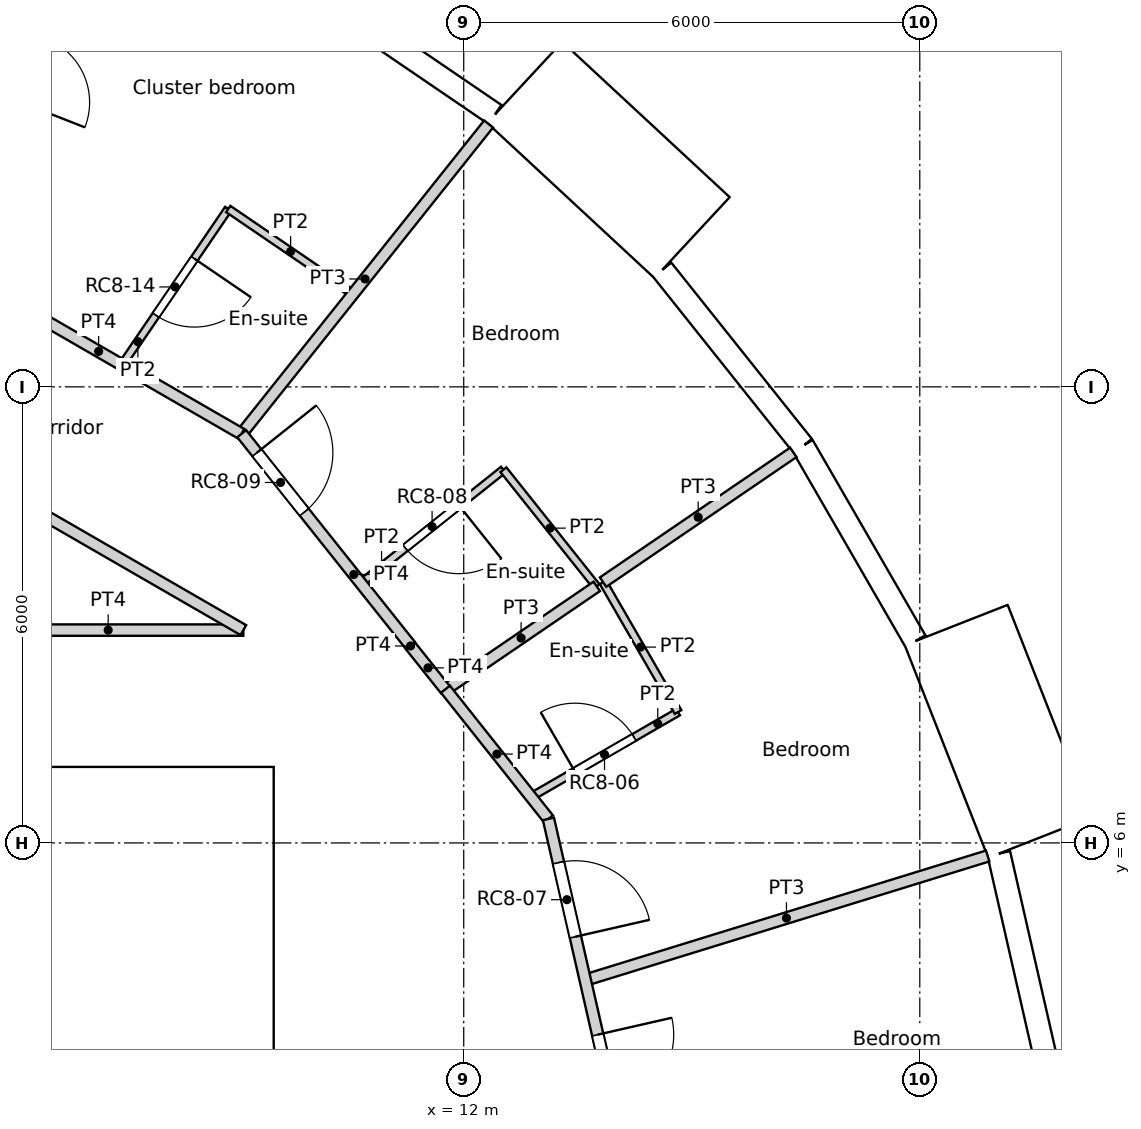
"""IFC4 building model, lengths in metres.
Left out: names, types, materials, properties, quantities, classifications, styles, units other than length and angle.
Written with IfcOpenShell. Run it as: python <this file> out.ifc"""

import sys

from ifc_helpers import new_model, si_unit, direction, frame, frame_2d, origin, origin_2d, place, context, subcontext, project, spatial, rectangle, circle, extrude, element, fill, save


model = new_model("IFC4")
c1 = context("Model", 3, precision=1e-05, world=origin(), true_north=direction((0.0, 1.0)))
c2 = subcontext(c1, "Body", "Model", "MODEL_VIEW")
j1 = project(units=[si_unit("LENGTHUNIT", "METRE"), si_unit("PLANEANGLEUNIT", "RADIAN")], contexts=[c1])
p1 = place(None, origin())
s1 = spatial("IfcSite", under=j1, at=p1, CompositionType="ELEMENT")
p2 = place(p1, origin())
s2 = spatial("IfcBuilding", under=s1, at=p2, CompositionType="ELEMENT")
p3 = place(p2, frame((0.0, 0.0, 305.4)))
s3 = spatial("IfcBuildingStorey", under=s2, at=p3, CompositionType="ELEMENT", Elevation=305.4)
for number, where, z_axis, x_axis in (
    (1, (17.986, 5.548, 0.0), (0.0, 0.0, 1.0), (1.0, 0.0, 0.0)),
    (2, (15.552, 10.603, 0.0), (0.0, 0.0, 1.0), (1.0, 0.0, 0.0)),
    (3, (11.735, 14.716, 0.0), (0.0, 0.0, 1.0), (1.0, 0.0, 0.0)),
):
    element("IfcColumn", number, at=place(p3, frame(where, z_axis=z_axis, x_axis=x_axis)), inside=s3, PredefinedType="COLUMN", context=c2, shape_type="SweptSolid", body=[
        extrude(circle(Radius=0.45, at=origin_2d()), origin(), (0.0, 0.0, 1.0), 3.6),
    ])
p4 = place(p3, frame((19.699, 2.969, 0.0), z_axis=(0.0, 0.0, 1.0), x_axis=(-0.222529389789, 0.974925982155, 0.0)))
e4 = element("IfcWall", 4, at=p4, inside=s3, PredefinedType="SOLIDWALL", context=c2, shape_type="SweptSolid", body=[
    extrude(rectangle(XDim=2.962, YDim=0.3, at=frame_2d((1.481, 0.0))), origin(), (0.0, 0.0, 1.0), 3.25),
])
p5 = place(p4, frame((1.481, 0.0, 1.55)))
e5 = element("IfcOpeningElement", 5, at=p5, cuts=e4, PredefinedType="OPENING", context=c2, shape_type="SweptSolid", body=[
    extrude(circle(Radius=0.9, at=origin_2d()), frame((0.0, 0.16, 0.0), z_axis=(0.0, -1.0, 0.0), x_axis=(1.0, 0.0, 0.0)), (0.0, 0.0, 1.0), 0.32),
])
p6 = place(p3, frame((19.576, 6.072, -0.35), z_axis=(0.0, 0.0, 1.0), x_axis=(-0.36537792632, 0.93085926485, 0.0)))
e6 = element("IfcWall", 6, at=p6, inside=s3, PredefinedType="ELEMENTEDWALL", context=c2, shape_type="SweptSolid", body=[
    extrude(rectangle(XDim=3.0, YDim=1.45, at=frame_2d((1.5, 0.0))), origin(), (0.0, 0.0, 1.0), 3.6),
])
p7 = place(p6, frame((1.5, 0.0, 1.9)))
e7 = element("IfcOpeningElement", 7, at=p7, cuts=e6, PredefinedType="OPENING", context=c2, shape_type="SweptSolid", body=[
    extrude(circle(Radius=0.9, at=origin_2d()), frame((0.0, 0.735, 0.0), z_axis=(0.0, -1.0, 0.0), x_axis=(1.0, 0.0, 0.0)), (0.0, 0.0, 1.0), 1.47),
])
p8 = place(p3, frame((17.941, 8.657, 0.0), z_axis=(0.0, 0.0, 1.0), x_axis=(-0.499950756475, 0.86605383268, 0.0)))
e8 = element("IfcWall", 8, at=p8, inside=s3, PredefinedType="SOLIDWALL", context=c2, shape_type="SweptSolid", body=[
    extrude(rectangle(XDim=2.962, YDim=0.3, at=frame_2d((1.481, 0.0))), origin(), (0.0, 0.0, 1.0), 2.8),
])
p9 = place(p8, frame((1.481, 0.0, 1.55)))
e9 = element("IfcOpeningElement", 9, at=p9, cuts=e8, PredefinedType="OPENING", context=c2, shape_type="SweptSolid", body=[
    extrude(circle(Radius=0.9, at=origin_2d()), frame((0.0, 0.16, 0.0), z_axis=(0.0, -1.0, 0.0), x_axis=(1.0, 0.0, 0.0)), (0.0, 0.0, 1.0), 0.32),
])
p10 = place(p3, frame((16.46, 11.222, 0.0), z_axis=(0.0, 0.0, 1.0), x_axis=(-0.623498236992, 0.781824755599, 0.0)))
e10 = element("IfcWall", 10, at=p10, inside=s3, PredefinedType="SOLIDWALL", context=c2, shape_type="SweptSolid", body=[
    extrude(rectangle(XDim=2.962, YDim=0.3, at=frame_2d((1.481, 0.0))), origin(), (0.0, 0.0, 1.0), 3.25),
])
p11 = place(p10, frame((1.481, 0.0, 1.55)))
e11 = element("IfcOpeningElement", 11, at=p11, cuts=e10, PredefinedType="OPENING", context=c2, shape_type="SweptSolid", body=[
    extrude(circle(Radius=0.9, at=origin_2d()), frame((0.0, 0.16, 0.0), z_axis=(0.0, -1.0, 0.0), x_axis=(1.0, 0.0, 0.0)), (0.0, 0.0, 1.0), 0.32),
])
p12 = place(p3, frame((15.003, 13.964, -0.35), z_axis=(0.0, 0.0, 1.0), x_axis=(-0.733022439167, 0.680204457261, 0.0)))
e12 = element("IfcWall", 12, at=p12, inside=s3, PredefinedType="ELEMENTEDWALL", context=c2, shape_type="SweptSolid", body=[
    extrude(rectangle(XDim=3.0, YDim=1.45, at=frame_2d((1.5, 0.0))), origin(), (0.0, 0.0, 1.0), 3.6),
])
p13 = place(p12, frame((1.5, 0.0, 1.9)))
e13 = element("IfcOpeningElement", 13, at=p13, cuts=e12, PredefinedType="OPENING", context=c2, shape_type="SweptSolid", body=[
    extrude(circle(Radius=0.9, at=origin_2d()), frame((0.0, 0.735, 0.0), z_axis=(0.0, -1.0, 0.0), x_axis=(1.0, 0.0, 0.0)), (0.0, 0.0, 1.0), 1.47),
])
p14 = place(p3, frame((12.408, 15.584, 0.0), z_axis=(0.0, 0.0, 1.0), x_axis=(-0.826236061068, 0.563324037646, 0.0)))
e14 = element("IfcWall", 14, at=p14, inside=s3, PredefinedType="SOLIDWALL", context=c2, shape_type="SweptSolid", body=[
    extrude(rectangle(XDim=2.962, YDim=0.3, at=frame_2d((1.481, 0.0))), origin(), (0.0, 0.0, 1.0), 2.8),
])
p15 = place(p14, frame((1.481, 0.0, 1.55)))
e15 = element("IfcOpeningElement", 15, at=p15, cuts=e14, PredefinedType="OPENING", context=c2, shape_type="SweptSolid", body=[
    extrude(circle(Radius=0.9, at=origin_2d()), frame((0.0, 0.16, 0.0), z_axis=(0.0, -1.0, 0.0), x_axis=(1.0, 0.0, 0.0)), (0.0, 0.0, 1.0), 0.32),
])
p16 = place(p3, frame((-9.5, 6.7, 0.0), z_axis=(0.0, 0.0, 1.0), x_axis=(1.0, 0.0, 0.0)))
e16 = element("IfcWall", 16, at=p16, inside=s3, PredefinedType="SOLIDWALL", context=c2, shape_type="SweptSolid", body=[
    extrude(rectangle(XDim=19.0, YDim=0.6, at=frame_2d((9.5, 0.0))), origin(), (0.0, 0.0, 1.0), 3.6),
])
p17 = place(p16, frame((5.35, 0.0, 0.0)))
e17 = element("IfcOpeningElement", 17, at=p17, cuts=e16, PredefinedType="OPENING", context=c2, shape_type="SweptSolid", body=[
    extrude(rectangle(XDim=1.7, YDim=2.1, at=frame_2d((0.85, 1.05))), frame((0.0, 0.3, 0.0), z_axis=(0.0, -1.0, 0.0), x_axis=(1.0, 0.0, 0.0)), (0.0, 0.0, 1.0), 0.6),
])
p18 = place(p3, frame((9.2, -6.4, 0.0), z_axis=(0.0, 0.0, 1.0), x_axis=(0.0, 1.0, 0.0)))
e18 = element("IfcWall", 18, at=p18, inside=s3, PredefinedType="SOLIDWALL", context=c2, shape_type="SweptSolid", body=[
    extrude(rectangle(XDim=12.8, YDim=0.6, at=frame_2d((6.4, 0.0))), origin(), (0.0, 0.0, 1.0), 3.6),
])
p19 = place(p18, frame((6.4, 0.0, 0.0)))
e19 = element("IfcOpeningElement", 19, at=p19, cuts=e18, PredefinedType="OPENING", context=c2, shape_type="SweptSolid", body=[
    extrude(rectangle(XDim=1.8, YDim=2.1, at=frame_2d((0.9, 1.05))), frame((0.0, 0.3, 0.0), z_axis=(0.0, -1.0, 0.0), x_axis=(1.0, 0.0, 0.0)), (0.0, 0.0, 1.0), 0.6),
])
p20 = place(p3, frame((0.896, 8.8, 0.0), z_axis=(0.0, 0.0, 1.0), x_axis=(1.0, 0.0, 0.0)))
e20 = element("IfcWall", 20, at=p20, inside=s3, PredefinedType="PARTITIONING", context=c2, shape_type="SweptSolid", body=[
    extrude(rectangle(XDim=8.205, YDim=0.15, at=frame_2d((4.102, 0.0))), origin(), (0.0, 0.0, 1.0), 3.25),
])
p21 = place(p20, frame((3.598, 0.0, 0.0)))
e21 = element("IfcOpeningElement", 21, at=p21, cuts=e20, PredefinedType="OPENING", context=c2, shape_type="SweptSolid", body=[
    extrude(rectangle(XDim=1.0, YDim=2.04, at=frame_2d((0.5, 1.02))), frame((0.0, 0.075, 0.0), z_axis=(0.0, -1.0, 0.0), x_axis=(1.0, 0.0, 0.0)), (0.0, 0.0, 1.0), 0.15),
])
p22 = place(p3, frame((9.079, 11.384, 0.0), z_axis=(0.0, 0.0, 1.0), x_axis=(0.623165080354, -0.782090328944, 0.0)))
e22 = element("IfcWall", 22, at=p22, inside=s3, PredefinedType="PARTITIONING", context=c2, shape_type="SweptSolid", body=[
    extrude(rectangle(XDim=3.564, YDim=0.15, at=frame_2d((1.782, 0.0))), origin(), (0.0, 0.0, 1.0), 3.25),
])
p23 = place(p22, frame((0.32, 0.0, 0.0)))
e23 = element("IfcOpeningElement", 23, at=p23, cuts=e22, PredefinedType="OPENING", context=c2, shape_type="SweptSolid", body=[
    extrude(rectangle(XDim=1.0, YDim=2.1, at=frame_2d((0.5, 1.05))), frame((0.0, 0.075, 0.0), z_axis=(0.0, -1.0, 0.0), x_axis=(1.0, 0.0, 0.0)), (0.0, 0.0, 1.0), 0.15),
])
p24 = place(p3, frame((11.3, 8.586, 0.0), z_axis=(0.0, 0.0, 1.0), x_axis=(0.0, 1.0, 0.0)))
e24 = element("IfcWall", 24, at=p24, inside=s3, PredefinedType="PARTITIONING", context=c2, shape_type="SweptSolid", body=[
    extrude(rectangle(XDim=0.01, YDim=0.15, at=frame_2d((0.005, 0.0))), origin(), (0.0, 0.0, 1.0), 3.25),
])
p25 = place(p3, frame((13.115, 6.316, 0.0), z_axis=(0.0, 0.0, 1.0), x_axis=(0.222568978642, -0.97491694505, 0.0)))
e25 = element("IfcWall", 25, at=p25, inside=s3, PredefinedType="PARTITIONING", context=c2, shape_type="SweptSolid", body=[
    extrude(rectangle(XDim=6.479, YDim=0.15, at=frame_2d((3.239, 0.0))), origin(), (0.0, 0.0, 1.0), 3.25),
])
p26 = place(p25, frame((2.911, 0.0, 0.0)))
e26 = element("IfcOpeningElement", 26, at=p26, cuts=e25, PredefinedType="OPENING", context=c2, shape_type="SweptSolid", body=[
    extrude(rectangle(XDim=1.0, YDim=2.1, at=frame_2d((0.5, 1.05))), frame((0.0, 0.075, 0.0), z_axis=(0.0, -1.0, 0.0), x_axis=(1.0, 0.0, 0.0)), (0.0, 0.0, 1.0), 0.15),
])
p27 = place(p25, frame((0.59, 0.0, 0.0)))
e27 = element("IfcOpeningElement", 27, at=p27, cuts=e25, PredefinedType="OPENING", context=c2, shape_type="SweptSolid", body=[
    extrude(rectangle(XDim=1.0, YDim=2.1, at=frame_2d((0.5, 1.05))), frame((0.0, 0.075, 0.0), z_axis=(0.0, -1.0, 0.0), x_axis=(1.0, 0.0, 0.0)), (0.0, 0.0, 1.0), 0.15),
])
p28 = place(p3, frame((11.76, 8.022, 0.0), z_axis=(0.0, 0.0, 1.0), x_axis=(0.62206805366, -0.782963177049, 0.0)))
e28 = element("IfcWall", 28, at=p28, inside=s3, PredefinedType="PARTITIONING", context=c2, shape_type="SweptSolid", body=[
    extrude(rectangle(XDim=2.179, YDim=0.15, at=frame_2d((1.089, 0.0))), origin(), (0.0, 0.0, 1.0), 3.25),
])
p29 = place(p3, frame((11.3, 8.592, 0.0), z_axis=(0.0, 0.0, 1.0), x_axis=(0.623405636383, -0.781898594785, 0.0)))
e29 = element("IfcWall", 29, at=p29, inside=s3, PredefinedType="PARTITIONING", context=c2, shape_type="SweptSolid", body=[
    extrude(rectangle(XDim=0.74, YDim=0.15, at=frame_2d((0.37, 0.0))), origin(), (0.0, 0.0, 1.0), 3.25),
])
p30 = place(p3, frame((3.261, 12.171, 0.0), z_axis=(0.0, 0.0, 1.0), x_axis=(0.866066809554, -0.499928276245, 0.0)))
e30 = element("IfcWall", 30, at=p30, inside=s3, PredefinedType="PARTITIONING", context=c2, shape_type="SweptSolid", body=[
    extrude(rectangle(XDim=6.743, YDim=0.15, at=frame_2d((3.371, 0.0))), origin(), (0.0, 0.0, 1.0), 3.25),
])
p31 = place(p3, frame((5.318, 13.551, 0.0), z_axis=(0.0, 0.0, 1.0), x_axis=(0.865990693744, -0.500060114735, 0.0)))
e31 = element("IfcWall", 31, at=p31, inside=s3, PredefinedType="PARTITIONING", context=c2, shape_type="SweptSolid", body=[
    extrude(rectangle(XDim=4.339, YDim=0.15, at=frame_2d((2.17, 0.0))), origin(), (0.0, 0.0, 1.0), 3.25),
])
p32 = place(p3, frame((13.599, 4.195, 0.0), z_axis=(0.0, 0.0, 1.0), x_axis=(0.955580602693, 0.294729896274, 0.0)))
e32 = element("IfcWall", 32, at=p32, inside=s3, PredefinedType="PARTITIONING", context=c2, shape_type="SweptSolid", body=[
    extrude(rectangle(XDim=5.54, YDim=0.15, at=frame_2d((2.77, 0.0))), origin(), (0.0, 0.0, 1.0), 3.25),
])
p33 = place(p3, frame((12.885, 6.605, 0.0), z_axis=(0.0, 0.0, 1.0), x_axis=(0.866076416361, 0.499911633214, 0.0)))
e33 = element("IfcWall", 33, at=p33, inside=s3, PredefinedType="PARTITIONING", context=c2, shape_type="SweptSolid", body=[
    extrude(rectangle(XDim=2.234, YDim=0.1, at=frame_2d((1.117, 0.0))), origin(), (0.0, 0.0, 1.0), 3.25),
])
p34 = place(p33, frame((0.667, 0.0, 0.0)))
e34 = element("IfcOpeningElement", 34, at=p34, cuts=e33, PredefinedType="OPENING", context=c2, shape_type="SweptSolid", body=[
    extrude(rectangle(XDim=0.9, YDim=2.04, at=frame_2d((0.45, 1.02))), frame((0.0, 0.05, 0.0), z_axis=(0.0, -1.0, 0.0), x_axis=(1.0, 0.0, 0.0)), (0.0, 0.0, 1.0), 0.1),
])
p35 = place(p3, frame((13.833, 9.431, 0.0), z_axis=(0.0, 0.0, 1.0), x_axis=(0.500143626598, -0.865942465048, 0.0)))
e35 = element("IfcWall", 35, at=p35, inside=s3, PredefinedType="PARTITIONING", context=c2, shape_type="SweptSolid", body=[
    extrude(rectangle(XDim=1.974, YDim=0.1, at=frame_2d((0.987, 0.0))), origin(), (0.0, 0.0, 1.0), 3.25),
])
p36 = place(p3, frame((13.833, 9.431, 0.0), z_axis=(0.0, 0.0, 1.0), x_axis=(0.826152320289, 0.56344684193, 0.0)))
e36 = element("IfcWall", 36, at=p36, inside=s3, PredefinedType="PARTITIONING", context=c2, shape_type="SweptSolid", body=[
    extrude(rectangle(XDim=3.03, YDim=0.15, at=frame_2d((1.515, 0.0))), origin(), (0.0, 0.0, 1.0), 3.25),
])
p37 = place(p3, frame((11.759, 8.017, 0.0), z_axis=(0.0, 0.0, 1.0), x_axis=(0.826143746222, 0.563459413426, 0.0)))
e37 = element("IfcWall", 37, at=p37, inside=s3, PredefinedType="PARTITIONING", context=c2, shape_type="SweptSolid", body=[
    extrude(rectangle(XDim=2.41, YDim=0.15, at=frame_2d((1.205, 0.0))), origin(), (0.0, 0.0, 1.0), 3.25),
])
p38 = place(p3, frame((12.522, 10.91, 0.0), z_axis=(0.0, 0.0, 1.0), x_axis=(0.623330716607, -0.781958322249, 0.0)))
e38 = element("IfcWall", 38, at=p38, inside=s3, PredefinedType="PARTITIONING", context=c2, shape_type="SweptSolid", body=[
    extrude(rectangle(XDim=1.965, YDim=0.1, at=frame_2d((0.983, 0.0))), origin(), (0.0, 0.0, 1.0), 3.25),
])
p39 = place(p3, frame((10.645, 9.413, 0.0), z_axis=(0.0, 0.0, 1.0), x_axis=(0.781830263661, 0.623491330191, 0.0)))
e39 = element("IfcWall", 39, at=p39, inside=s3, PredefinedType="PARTITIONING", context=c2, shape_type="SweptSolid", body=[
    extrude(rectangle(XDim=2.401, YDim=0.1, at=frame_2d((1.2, 0.0))), origin(), (0.0, 0.0, 1.0), 3.25),
])
p40 = place(p39, frame((0.751, 0.0, 0.0)))
e40 = element("IfcOpeningElement", 40, at=p40, cuts=e39, PredefinedType="OPENING", context=c2, shape_type="SweptSolid", body=[
    extrude(rectangle(XDim=0.9, YDim=2.04, at=frame_2d((0.45, 1.02))), frame((0.0, 0.05, 0.0), z_axis=(0.0, -1.0, 0.0), x_axis=(1.0, 0.0, 0.0)), (0.0, 0.0, 1.0), 0.1),
])
p41 = place(p3, frame((9.076, 11.381, 0.0), z_axis=(0.0, 0.0, 1.0), x_axis=(0.623409504508, 0.781895510723, 0.0)))
e41 = element("IfcWall", 41, at=p41, inside=s3, PredefinedType="PARTITIONING", context=c2, shape_type="SweptSolid", body=[
    extrude(rectangle(XDim=5.214, YDim=0.15, at=frame_2d((2.607, 0.0))), origin(), (0.0, 0.0, 1.0), 3.25),
])
p42 = place(p3, frame((6.077, 15.485, 0.0), z_axis=(0.0, 0.0, 1.0), x_axis=(0.365344119851, 0.93087253375, 0.0)))
e42 = element("IfcWall", 42, at=p42, inside=s3, PredefinedType="PARTITIONING", context=c2, shape_type="SweptSolid", body=[
    extrude(rectangle(XDim=3.137, YDim=0.1, at=frame_2d((1.568, 0.0))), origin(), (0.0, 0.0, 1.0), 3.25),
])
p43 = place(p42, frame((0.277, 0.0, 0.0)))
e43 = element("IfcOpeningElement", 43, at=p43, cuts=e42, PredefinedType="OPENING", context=c2, shape_type="SweptSolid", body=[
    extrude(rectangle(XDim=0.9, YDim=2.1, at=frame_2d((0.45, 1.05))), frame((0.0, 0.05, 0.0), z_axis=(0.0, -1.0, 0.0), x_axis=(1.0, 0.0, 0.0)), (0.0, 0.0, 1.0), 0.1),
])
p44 = place(p3, frame((8.902, 14.34, 0.0), z_axis=(0.0, 0.0, 1.0), x_axis=(0.826141514998, -0.563462684831, 0.0)))
e44 = element("IfcWall", 44, at=p44, inside=s3, PredefinedType="PARTITIONING", context=c2, shape_type="SweptSolid", body=[
    extrude(rectangle(XDim=1.986, YDim=0.1, at=frame_2d((0.993, 0.0))), origin(), (0.0, 0.0, 1.0), 3.25),
])
p45 = place(p3, frame((7.504, 12.289, 0.0), z_axis=(0.0, 0.0, 1.0), x_axis=(0.563272733387, 0.826271037749, 0.0)))
e45 = element("IfcWall", 45, at=p45, inside=s3, PredefinedType="PARTITIONING", context=c2, shape_type="SweptSolid", body=[
    extrude(rectangle(XDim=2.482, YDim=0.1, at=frame_2d((1.241, 0.0))), origin(), (0.0, 0.0, 1.0), 3.25),
])
p46 = place(p45, frame((0.791, 0.0, 0.0)))
e46 = element("IfcOpeningElement", 46, at=p46, cuts=e45, PredefinedType="OPENING", context=c2, shape_type="SweptSolid", body=[
    extrude(rectangle(XDim=0.9, YDim=2.04, at=frame_2d((0.45, 1.02))), frame((0.0, 0.05, 0.0), z_axis=(0.0, -1.0, 0.0), x_axis=(1.0, 0.0, 0.0)), (0.0, 0.0, 1.0), 0.1),
])
p47 = place(p5, origin())
e47 = element("IfcWindow", 47, at=p47, inside=s3, PartitioningType="SINGLE_PANEL", PredefinedType="WINDOW", context=c2, shape_type="SweptSolid", body=[
    extrude(circle(Radius=0.9, at=origin_2d()), frame((0.0, 0.12, 0.0), z_axis=(0.0, -1.0, 0.0), x_axis=(1.0, 0.0, 0.0)), (0.0, 0.0, 1.0), 0.1),
])
fill(e5, e47)
p48 = place(p7, origin())
e48 = element("IfcWindow", 48, at=p48, inside=s3, PartitioningType="SINGLE_PANEL", PredefinedType="WINDOW", context=c2, shape_type="SweptSolid", body=[
    extrude(circle(Radius=0.9, at=origin_2d()), frame((0.0, 0.695, 0.0), z_axis=(0.0, -1.0, 0.0), x_axis=(1.0, 0.0, 0.0)), (0.0, 0.0, 1.0), 0.1),
])
fill(e7, e48)
p49 = place(p9, origin())
e49 = element("IfcWindow", 49, at=p49, inside=s3, PartitioningType="SINGLE_PANEL", PredefinedType="WINDOW", context=c2, shape_type="SweptSolid", body=[
    extrude(circle(Radius=0.9, at=origin_2d()), frame((0.0, 0.12, 0.0), z_axis=(0.0, -1.0, 0.0), x_axis=(1.0, 0.0, 0.0)), (0.0, 0.0, 1.0), 0.1),
])
fill(e9, e49)
p50 = place(p11, origin())
e50 = element("IfcWindow", 50, at=p50, inside=s3, PartitioningType="SINGLE_PANEL", PredefinedType="WINDOW", context=c2, shape_type="SweptSolid", body=[
    extrude(circle(Radius=0.9, at=origin_2d()), frame((0.0, 0.12, 0.0), z_axis=(0.0, -1.0, 0.0), x_axis=(1.0, 0.0, 0.0)), (0.0, 0.0, 1.0), 0.1),
])
fill(e11, e50)
p51 = place(p13, origin())
e51 = element("IfcWindow", 51, at=p51, inside=s3, PartitioningType="SINGLE_PANEL", PredefinedType="WINDOW", context=c2, shape_type="SweptSolid", body=[
    extrude(circle(Radius=0.9, at=origin_2d()), frame((0.0, 0.695, 0.0), z_axis=(0.0, -1.0, 0.0), x_axis=(1.0, 0.0, 0.0)), (0.0, 0.0, 1.0), 0.1),
])
fill(e13, e51)
p52 = place(p15, origin())
e52 = element("IfcWindow", 52, at=p52, inside=s3, PartitioningType="SINGLE_PANEL", PredefinedType="WINDOW", context=c2, shape_type="SweptSolid", body=[
    extrude(circle(Radius=0.9, at=origin_2d()), frame((0.0, 0.12, 0.0), z_axis=(0.0, -1.0, 0.0), x_axis=(1.0, 0.0, 0.0)), (0.0, 0.0, 1.0), 0.1),
])
fill(e15, e52)
p53 = place(p26, origin())
e53 = element("IfcDoor", 53, at=p53, inside=s3, OperationType="SINGLE_SWING_LEFT", PredefinedType="DOOR", context=c2, shape_type="SweptSolid", body=[
    extrude(rectangle(XDim=1.0, YDim=2.1, at=frame_2d((0.5, 1.05))), frame((0.0, 0.025, 0.0), z_axis=(0.0, -1.0, 0.0), x_axis=(1.0, 0.0, 0.0)), (0.0, 0.0, 1.0), 0.05),
])
fill(e26, e53)
p54 = place(p34, origin())
e54 = element("IfcDoor", 54, at=p54, inside=s3, OperationType="SINGLE_SWING_LEFT", PredefinedType="DOOR", context=c2, shape_type="SweptSolid", body=[
    extrude(rectangle(XDim=0.9, YDim=2.04, at=frame_2d((0.45, 1.02))), frame((0.0, 0.025, 0.0), z_axis=(0.0, -1.0, 0.0), x_axis=(1.0, 0.0, 0.0)), (0.0, 0.0, 1.0), 0.05),
])
fill(e34, e54)
p55 = place(p27, origin())
e55 = element("IfcDoor", 55, at=p55, inside=s3, OperationType="SINGLE_SWING_RIGHT", PredefinedType="DOOR", context=c2, shape_type="SweptSolid", body=[
    extrude(rectangle(XDim=1.0, YDim=2.1, at=frame_2d((0.5, 1.05))), frame((0.0, 0.025, 0.0), z_axis=(0.0, -1.0, 0.0), x_axis=(1.0, 0.0, 0.0)), (0.0, 0.0, 1.0), 0.05),
])
fill(e27, e55)
p56 = place(p40, origin())
e56 = element("IfcDoor", 56, at=p56, inside=s3, OperationType="SINGLE_SWING_LEFT", PredefinedType="DOOR", context=c2, shape_type="SweptSolid", body=[
    extrude(rectangle(XDim=0.9, YDim=2.04, at=frame_2d((0.45, 1.02))), frame((0.0, 0.025, 0.0), z_axis=(0.0, -1.0, 0.0), x_axis=(1.0, 0.0, 0.0)), (0.0, 0.0, 1.0), 0.05),
])
fill(e40, e56)
p57 = place(p23, origin())
e57 = element("IfcDoor", 57, at=p57, inside=s3, OperationType="SINGLE_SWING_LEFT", PredefinedType="DOOR", context=c2, shape_type="SweptSolid", body=[
    extrude(rectangle(XDim=1.0, YDim=2.1, at=frame_2d((0.5, 1.05))), frame((0.0, 0.025, 0.0), z_axis=(0.0, -1.0, 0.0), x_axis=(1.0, 0.0, 0.0)), (0.0, 0.0, 1.0), 0.05),
])
fill(e23, e57)
p58 = place(p46, origin())
e58 = element("IfcDoor", 58, at=p58, inside=s3, OperationType="SINGLE_SWING_LEFT", PredefinedType="DOOR", context=c2, shape_type="SweptSolid", body=[
    extrude(rectangle(XDim=0.9, YDim=2.04, at=frame_2d((0.45, 1.02))), frame((0.0, 0.025, 0.0), z_axis=(0.0, -1.0, 0.0), x_axis=(1.0, 0.0, 0.0)), (0.0, 0.0, 1.0), 0.05),
])
fill(e46, e58)
save(model, sys.argv[1])
